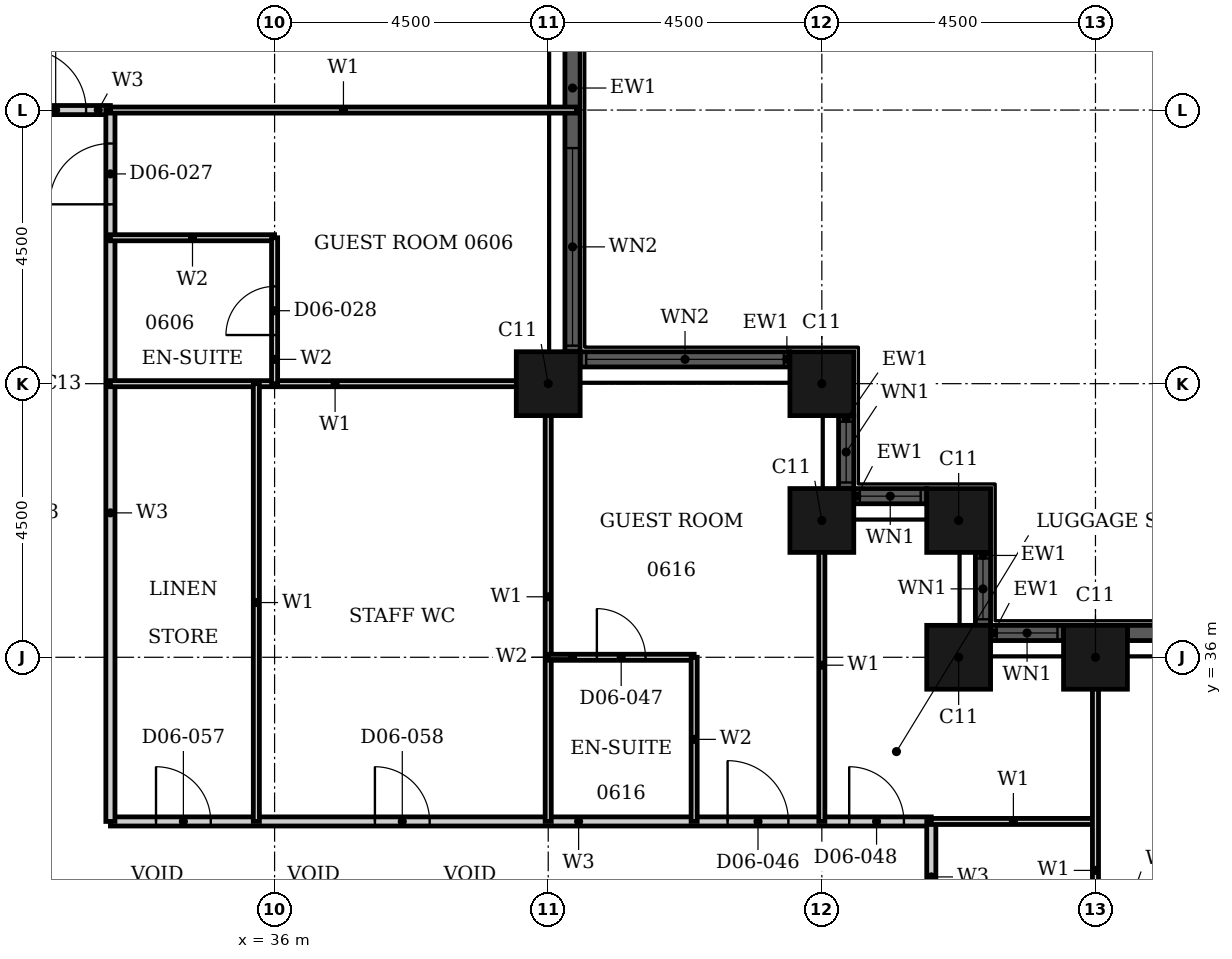
"""IFC4 building model, lengths in metres.
Left out: names, types, materials, properties, quantities, classifications, styles, units other than length and angle.
Written with IfcOpenShell. Run it as: python <this file> out.ifc"""

import sys

from ifc_helpers import new_model, si_unit, direction, frame, frame_2d, origin, origin_2d, place, context, subcontext, project, spatial, rectangle, hollow_rectangle, extrude, element, fill, save


model = new_model("IFC4")
c1 = context("Model", 3, precision=1e-05, world=origin(), true_north=direction((0.0, 1.0)))
c2 = subcontext(c1, "Body", "Model", "MODEL_VIEW")
j1 = project(units=[si_unit("LENGTHUNIT", "METRE"), si_unit("PLANEANGLEUNIT", "RADIAN")], contexts=[c1])
p1 = place(None, origin())
s1 = spatial("IfcSite", under=j1, at=p1, CompositionType="ELEMENT")
p2 = place(p1, origin())
s2 = spatial("IfcBuilding", under=s1, at=p2, CompositionType="ELEMENT")
p3 = place(p2, frame((0.0, 0.0, 33.6)))
s3 = spatial("IfcBuildingStorey", under=s2, at=p3, CompositionType="ELEMENT", Elevation=33.6)
for number, where, z_axis, x_axis in (
    (1, (49.5, 36.0, 0.0), (0.0, 0.0, 1.0), (1.0, 0.0, 0.0)),
    (2, (47.25, 36.0, 0.0), (0.0, 0.0, 1.0), (1.0, 0.0, 0.0)),
    (3, (47.25, 38.25, 0.0), (0.0, 0.0, 1.0), (1.0, 0.0, 0.0)),
    (4, (45.0, 38.25, 0.0), (0.0, 0.0, 1.0), (1.0, 0.0, 0.0)),
    (5, (45.0, 40.5, 0.0), (0.0, 0.0, 1.0), (1.0, 0.0, 0.0)),
    (6, (40.5, 40.5, 0.0), (0.0, 0.0, 1.0), (1.0, 0.0, 0.0)),
):
    element("IfcColumn", number, at=place(p3, frame(where, z_axis=z_axis, x_axis=x_axis)), inside=s3, PredefinedType="COLUMN", context=c2, shape_type="SweptSolid", body=[
        extrude(hollow_rectangle(XDim=1.05, YDim=1.05, WallThickness=0.034, at=origin_2d()), origin(), (0.0, 0.0, 1.0), 3.6),
    ])
p4 = place(p3, frame((57.975, 36.4, 0.0), z_axis=(0.0, 0.0, 1.0), x_axis=(-1.0, 0.0, 0.0)))
e7 = element("IfcWall", 7, at=p4, inside=s3, PredefinedType="SOLIDWALL", context=c2, shape_type="SweptSolid", body=[
    extrude(rectangle(XDim=7.95, YDim=0.25, at=frame_2d((3.975, 0.0))), origin(), (0.0, 0.0, 1.0), 3.6),
])
p5 = place(p4, frame((0.1, 0.0, 0.9)))
e8 = element("IfcOpeningElement", 8, at=p5, cuts=e7, PredefinedType="OPENING", context=c2, shape_type="SweptSolid", body=[
    extrude(rectangle(XDim=3.25, YDim=2.08, at=frame_2d((1.625, 1.04))), frame((0.0, 0.135, 0.0), z_axis=(0.0, -1.0, 0.0), x_axis=(1.0, 0.0, 0.0)), (0.0, 0.0, 1.0), 0.27),
])
p6 = place(p4, frame((5.325, 0.0, 0.0)))
e9 = element("IfcOpeningElement", 9, at=p6, cuts=e7, PredefinedType="OPENING", context=c2, shape_type="SweptSolid", body=[
    extrude(rectangle(XDim=1.8, YDim=2.4, at=frame_2d((0.9, 1.2))), frame((0.0, 0.135, 0.0), z_axis=(0.0, -1.0, 0.0), x_axis=(1.0, 0.0, 0.0)), (0.0, 0.0, 1.0), 0.27),
])
p7 = place(p3, frame((48.975, 36.4, 0.0), z_axis=(0.0, 0.0, 1.0), x_axis=(-1.0, 0.0, 0.0)))
e10 = element("IfcWall", 10, at=p7, inside=s3, PredefinedType="SOLIDWALL", context=c2, shape_type="SweptSolid", body=[
    extrude(rectangle(XDim=1.2, YDim=0.25, at=frame_2d((0.6, 0.0))), origin(), (0.0, 0.0, 1.0), 3.6),
])
p8 = place(p7, frame((0.1, 0.0, 0.9)))
e11 = element("IfcOpeningElement", 11, at=p8, cuts=e10, PredefinedType="OPENING", context=c2, shape_type="SweptSolid", body=[
    extrude(rectangle(XDim=1.0, YDim=2.08, at=frame_2d((0.5, 1.04))), frame((0.0, 0.135, 0.0), z_axis=(0.0, -1.0, 0.0), x_axis=(1.0, 0.0, 0.0)), (0.0, 0.0, 1.0), 0.27),
])
p9 = place(p3, frame((47.65, 36.525, 0.0), z_axis=(0.0, 0.0, 1.0), x_axis=(0.0, 1.0, 0.0)))
e12 = element("IfcWall", 12, at=p9, inside=s3, PredefinedType="SOLIDWALL", context=c2, shape_type="SweptSolid", body=[
    extrude(rectangle(XDim=1.2, YDim=0.25, at=frame_2d((0.6, 0.0))), origin(), (0.0, 0.0, 1.0), 3.6),
])
p10 = place(p9, frame((0.1, 0.0, 0.9)))
e13 = element("IfcOpeningElement", 13, at=p10, cuts=e12, PredefinedType="OPENING", context=c2, shape_type="SweptSolid", body=[
    extrude(rectangle(XDim=1.0, YDim=2.08, at=frame_2d((0.5, 1.04))), frame((0.0, 0.135, 0.0), z_axis=(0.0, -1.0, 0.0), x_axis=(1.0, 0.0, 0.0)), (0.0, 0.0, 1.0), 0.27),
])
p11 = place(p3, frame((46.725, 38.65, 0.0), z_axis=(0.0, 0.0, 1.0), x_axis=(-1.0, 0.0, 0.0)))
e14 = element("IfcWall", 14, at=p11, inside=s3, PredefinedType="SOLIDWALL", context=c2, shape_type="SweptSolid", body=[
    extrude(rectangle(XDim=1.2, YDim=0.25, at=frame_2d((0.6, 0.0))), origin(), (0.0, 0.0, 1.0), 3.6),
])
p12 = place(p11, frame((0.1, 0.0, 0.9)))
e15 = element("IfcOpeningElement", 15, at=p12, cuts=e14, PredefinedType="OPENING", context=c2, shape_type="SweptSolid", body=[
    extrude(rectangle(XDim=1.0, YDim=2.08, at=frame_2d((0.5, 1.04))), frame((0.0, 0.135, 0.0), z_axis=(0.0, -1.0, 0.0), x_axis=(1.0, 0.0, 0.0)), (0.0, 0.0, 1.0), 0.27),
])
p13 = place(p3, frame((45.4, 38.775, 0.0), z_axis=(0.0, 0.0, 1.0), x_axis=(0.0, 1.0, 0.0)))
e16 = element("IfcWall", 16, at=p13, inside=s3, PredefinedType="SOLIDWALL", context=c2, shape_type="SweptSolid", body=[
    extrude(rectangle(XDim=1.2, YDim=0.25, at=frame_2d((0.6, 0.0))), origin(), (0.0, 0.0, 1.0), 3.6),
])
p14 = place(p13, frame((0.1, 0.0, 0.9)))
e17 = element("IfcOpeningElement", 17, at=p14, cuts=e16, PredefinedType="OPENING", context=c2, shape_type="SweptSolid", body=[
    extrude(rectangle(XDim=1.0, YDim=2.08, at=frame_2d((0.5, 1.04))), frame((0.0, 0.135, 0.0), z_axis=(0.0, -1.0, 0.0), x_axis=(1.0, 0.0, 0.0)), (0.0, 0.0, 1.0), 0.27),
])
p15 = place(p3, frame((44.475, 40.9, 0.0), z_axis=(0.0, 0.0, 1.0), x_axis=(-1.0, 0.0, 0.0)))
e18 = element("IfcWall", 18, at=p15, inside=s3, PredefinedType="SOLIDWALL", context=c2, shape_type="SweptSolid", body=[
    extrude(rectangle(XDim=3.45, YDim=0.25, at=frame_2d((1.725, 0.0))), origin(), (0.0, 0.0, 1.0), 3.6),
])
p16 = place(p15, frame((0.1, 0.0, 0.9)))
e19 = element("IfcOpeningElement", 19, at=p16, cuts=e18, PredefinedType="OPENING", context=c2, shape_type="SweptSolid", body=[
    extrude(rectangle(XDim=3.25, YDim=2.08, at=frame_2d((1.625, 1.04))), frame((0.0, 0.135, 0.0), z_axis=(0.0, -1.0, 0.0), x_axis=(1.0, 0.0, 0.0)), (0.0, 0.0, 1.0), 0.27),
])
p17 = place(p3, frame((40.9, 41.025, 0.0), z_axis=(0.0, 0.0, 1.0), x_axis=(0.0, 1.0, 0.0)))
e20 = element("IfcWall", 20, at=p17, inside=s3, PredefinedType="SOLIDWALL", context=c2, shape_type="SweptSolid", body=[
    extrude(rectangle(XDim=7.95, YDim=0.25, at=frame_2d((3.975, 0.0))), origin(), (0.0, 0.0, 1.0), 3.6),
])
p18 = place(p17, frame((0.1, 0.0, 0.9)))
e21 = element("IfcOpeningElement", 21, at=p18, cuts=e20, PredefinedType="OPENING", context=c2, shape_type="SweptSolid", body=[
    extrude(rectangle(XDim=3.25, YDim=2.08, at=frame_2d((1.625, 1.04))), frame((0.0, 0.135, 0.0), z_axis=(0.0, -1.0, 0.0), x_axis=(1.0, 0.0, 0.0)), (0.0, 0.0, 1.0), 0.27),
])
p19 = place(p17, frame((5.325, 0.0, 0.0)))
e22 = element("IfcOpeningElement", 22, at=p19, cuts=e20, PredefinedType="OPENING", context=c2, shape_type="SweptSolid", body=[
    extrude(rectangle(XDim=1.8, YDim=2.4, at=frame_2d((0.9, 1.2))), frame((0.0, 0.135, 0.0), z_axis=(0.0, -1.0, 0.0), x_axis=(1.0, 0.0, 0.0)), (0.0, 0.0, 1.0), 0.27),
])
p20 = place(p3, frame((33.3, 33.3, 0.0), z_axis=(0.0, 0.0, 1.0), x_axis=(1.0, 0.0, 0.0)))
e23 = element("IfcWall", 23, at=p20, inside=s3, PredefinedType="PARTITIONING", context=c2, shape_type="SweptSolid", body=[
    extrude(rectangle(XDim=13.5, YDim=0.15, at=frame_2d((6.75, 0.0))), origin(), (0.0, 0.0, 1.0), 3.3),
])
p21 = place(p20, frame((10.15, 0.0, 0.0)))
e24 = element("IfcOpeningElement", 24, at=p21, cuts=e23, PredefinedType="OPENING", context=c2, shape_type="SweptSolid", body=[
    extrude(rectangle(XDim=1.0, YDim=2.1, at=frame_2d((0.5, 1.05))), frame((0.0, 0.085, 0.0), z_axis=(0.0, -1.0, 0.0), x_axis=(1.0, 0.0, 0.0)), (0.0, 0.0, 1.0), 0.17),
])
p22 = place(p20, frame((12.15, 0.0, 0.0)))
e25 = element("IfcOpeningElement", 25, at=p22, cuts=e23, PredefinedType="OPENING", context=c2, shape_type="SweptSolid", body=[
    extrude(rectangle(XDim=0.9, YDim=2.1, at=frame_2d((0.45, 1.05))), frame((0.0, 0.085, 0.0), z_axis=(0.0, -1.0, 0.0), x_axis=(1.0, 0.0, 0.0)), (0.0, 0.0, 1.0), 0.17),
])
p23 = place(p20, frame((0.75, 0.0, 0.0)))
e26 = element("IfcOpeningElement", 26, at=p23, cuts=e23, PredefinedType="OPENING", context=c2, shape_type="SweptSolid", body=[
    extrude(rectangle(XDim=0.9, YDim=2.1, at=frame_2d((0.45, 1.05))), frame((0.0, 0.085, 0.0), z_axis=(0.0, -1.0, 0.0), x_axis=(1.0, 0.0, 0.0)), (0.0, 0.0, 1.0), 0.17),
])
p24 = place(p20, frame((4.35, 0.0, 0.0)))
e27 = element("IfcOpeningElement", 27, at=p24, cuts=e23, PredefinedType="OPENING", context=c2, shape_type="SweptSolid", body=[
    extrude(rectangle(XDim=0.9, YDim=2.1, at=frame_2d((0.45, 1.05))), frame((0.0, 0.085, 0.0), z_axis=(0.0, -1.0, 0.0), x_axis=(1.0, 0.0, 0.0)), (0.0, 0.0, 1.0), 0.17),
])
p25 = place(p3, frame((31.5, 45.0, 0.0), z_axis=(0.0, 0.0, 1.0), x_axis=(1.0, 0.0, 0.0)))
e28 = element("IfcWall", 28, at=p25, inside=s3, PredefinedType="PARTITIONING", context=c2, shape_type="SweptSolid", body=[
    extrude(rectangle(XDim=1.8, YDim=0.15, at=frame_2d((0.9, 0.0))), origin(), (0.0, 0.0, 1.0), 3.3),
])
p26 = place(p25, frame((0.4, 0.0, 0.0)))
e29 = element("IfcOpeningElement", 29, at=p26, cuts=e28, PredefinedType="OPENING", context=c2, shape_type="SweptSolid", body=[
    extrude(rectangle(XDim=1.0, YDim=2.1, at=frame_2d((0.5, 1.05))), frame((0.0, 0.085, 0.0), z_axis=(0.0, -1.0, 0.0), x_axis=(1.0, 0.0, 0.0)), (0.0, 0.0, 1.0), 0.17),
])
p27 = place(p3, frame((33.3, 33.3, 0.0), z_axis=(0.0, 0.0, 1.0), x_axis=(0.0, 1.0, 0.0)))
e30 = element("IfcWall", 30, at=p27, inside=s3, PredefinedType="PARTITIONING", context=c2, shape_type="SweptSolid", body=[
    extrude(rectangle(XDim=11.7, YDim=0.15, at=frame_2d((5.85, 0.0))), origin(), (0.0, 0.0, 1.0), 3.3),
])
p28 = place(p27, frame((10.15, 0.0, 0.0)))
e31 = element("IfcOpeningElement", 31, at=p28, cuts=e30, PredefinedType="OPENING", context=c2, shape_type="SweptSolid", body=[
    extrude(rectangle(XDim=1.0, YDim=2.1, at=frame_2d((0.5, 1.05))), frame((0.0, 0.085, 0.0), z_axis=(0.0, -1.0, 0.0), x_axis=(1.0, 0.0, 0.0)), (0.0, 0.0, 1.0), 0.17),
])
p29 = place(p3, frame((46.8, 28.8, 0.0), z_axis=(0.0, 0.0, 1.0), x_axis=(0.0, 1.0, 0.0)))
e32 = element("IfcWall", 32, at=p29, inside=s3, PredefinedType="PARTITIONING", context=c2, shape_type="SweptSolid", body=[
    extrude(rectangle(XDim=4.5, YDim=0.15, at=frame_2d((2.25, 0.0))), origin(), (0.0, 0.0, 1.0), 3.3),
])
p30 = place(p29, frame((1.725, 0.0, 0.0)))
e33 = element("IfcOpeningElement", 33, at=p30, cuts=e32, PredefinedType="OPENING", context=c2, shape_type="SweptSolid", body=[
    extrude(rectangle(XDim=0.95, YDim=2.1, at=frame_2d((0.475, 1.05))), frame((0.0, 0.085, 0.0), z_axis=(0.0, -1.0, 0.0), x_axis=(1.0, 0.0, 0.0)), (0.0, 0.0, 1.0), 0.17),
])
p31 = place(p3, frame((46.8, 33.3, 0.0), z_axis=(0.0, 0.0, 1.0), x_axis=(1.0, 0.0, 0.0)))
e34 = element("IfcWall", 34, at=p31, inside=s3, PredefinedType="PARTITIONING", context=c2, shape_type="SweptSolid", body=[
    extrude(rectangle(XDim=2.7, YDim=0.1, at=frame_2d((1.35, 0.0))), origin(), (0.0, 0.0, 1.0), 3.3),
])
p32 = place(p3, frame((33.3, 40.5, 0.0), z_axis=(0.0, 0.0, 1.0), x_axis=(1.0, 0.0, 0.0)))
e35 = element("IfcWall", 35, at=p32, inside=s3, PredefinedType="PARTITIONING", context=c2, shape_type="SweptSolid", body=[
    extrude(rectangle(XDim=7.39, YDim=0.1, at=frame_2d((3.695, 0.0))), origin(), (0.0, 0.0, 1.0), 2.38),
])
p33 = place(p3, frame((33.3, 45.0, 0.0), z_axis=(0.0, 0.0, 1.0), x_axis=(1.0, 0.0, 0.0)))
e36 = element("IfcWall", 36, at=p33, inside=s3, PredefinedType="PARTITIONING", context=c2, shape_type="SweptSolid", body=[
    extrude(rectangle(XDim=7.665, YDim=0.1, at=frame_2d((3.833, 0.0))), origin(), (0.0, 0.0, 1.0), 3.3),
])
p34 = place(p3, frame((35.7, 33.3, 0.0), z_axis=(0.0, 0.0, 1.0), x_axis=(0.0, 1.0, 0.0)))
e37 = element("IfcWall", 37, at=p34, inside=s3, PredefinedType="PARTITIONING", context=c2, shape_type="SweptSolid", body=[
    extrude(rectangle(XDim=7.2, YDim=0.1, at=frame_2d((3.6, 0.0))), origin(), (0.0, 0.0, 1.0), 3.3),
])
p35 = place(p3, frame((40.5, 33.3, 0.0), z_axis=(0.0, 0.0, 1.0), x_axis=(0.0, 1.0, 0.0)))
e38 = element("IfcWall", 38, at=p35, inside=s3, PredefinedType="PARTITIONING", context=c2, shape_type="SweptSolid", body=[
    extrude(rectangle(XDim=7.39, YDim=0.1, at=frame_2d((3.695, 0.0))), origin(), (0.0, 0.0, 1.0), 3.3),
])
p36 = place(p3, frame((45.0, 33.3, 0.0), z_axis=(0.0, 0.0, 1.0), x_axis=(0.0, 1.0, 0.0)))
e39 = element("IfcWall", 39, at=p36, inside=s3, PredefinedType="PARTITIONING", context=c2, shape_type="SweptSolid", body=[
    extrude(rectangle(XDim=5.14, YDim=0.1, at=frame_2d((2.57, 0.0))), origin(), (0.0, 0.0, 1.0), 3.3),
])
p37 = place(p3, frame((49.5, 28.8, 0.0), z_axis=(0.0, 0.0, 1.0), x_axis=(0.0, 1.0, 0.0)))
e40 = element("IfcWall", 40, at=p37, inside=s3, PredefinedType="PARTITIONING", context=c2, shape_type="SweptSolid", body=[
    extrude(rectangle(XDim=7.39, YDim=0.1, at=frame_2d((3.695, 0.0))), origin(), (0.0, 0.0, 1.0), 2.38),
])
p38 = place(p3, frame((40.5, 36.0, 0.0), z_axis=(0.0, 0.0, 1.0), x_axis=(1.0, 0.0, 0.0)))
e41 = element("IfcWall", 41, at=p38, inside=s3, PredefinedType="PARTITIONING", context=c2, shape_type="SweptSolid", body=[
    extrude(rectangle(XDim=2.4, YDim=0.1, at=frame_2d((1.2, 0.0))), origin(), (0.0, 0.0, 1.0), 3.3),
])
p39 = place(p38, frame((0.8, 0.0, 0.0)))
e42 = element("IfcOpeningElement", 42, at=p39, cuts=e41, PredefinedType="OPENING", context=c2, shape_type="SweptSolid", body=[
    extrude(rectangle(XDim=0.8, YDim=2.1, at=frame_2d((0.4, 1.05))), frame((0.0, 0.06, 0.0), z_axis=(0.0, -1.0, 0.0), x_axis=(1.0, 0.0, 0.0)), (0.0, 0.0, 1.0), 0.12),
])
p40 = place(p3, frame((33.3, 42.9, 0.0), z_axis=(0.0, 0.0, 1.0), x_axis=(1.0, 0.0, 0.0)))
e43 = element("IfcWall", 43, at=p40, inside=s3, PredefinedType="PARTITIONING", context=c2, shape_type="SweptSolid", body=[
    extrude(rectangle(XDim=2.7, YDim=0.1, at=frame_2d((1.35, 0.0))), origin(), (0.0, 0.0, 1.0), 3.3),
])
p41 = place(p3, frame((36.0, 40.5, 0.0), z_axis=(0.0, 0.0, 1.0), x_axis=(0.0, 1.0, 0.0)))
e44 = element("IfcWall", 44, at=p41, inside=s3, PredefinedType="PARTITIONING", context=c2, shape_type="SweptSolid", body=[
    extrude(rectangle(XDim=2.4, YDim=0.1, at=frame_2d((1.2, 0.0))), origin(), (0.0, 0.0, 1.0), 2.58),
])
p42 = place(p41, frame((0.8, 0.0, 0.0)))
e45 = element("IfcOpeningElement", 45, at=p42, cuts=e44, PredefinedType="OPENING", context=c2, shape_type="SweptSolid", body=[
    extrude(rectangle(XDim=0.8, YDim=2.1, at=frame_2d((0.4, 1.05))), frame((0.0, 0.06, 0.0), z_axis=(0.0, -1.0, 0.0), x_axis=(1.0, 0.0, 0.0)), (0.0, 0.0, 1.0), 0.12),
])
p43 = place(p3, frame((42.9, 33.3, 0.0), z_axis=(0.0, 0.0, 1.0), x_axis=(0.0, 1.0, 0.0)))
e46 = element("IfcWall", 46, at=p43, inside=s3, PredefinedType="PARTITIONING", context=c2, shape_type="SweptSolid", body=[
    extrude(rectangle(XDim=2.7, YDim=0.1, at=frame_2d((1.35, 0.0))), origin(), (0.0, 0.0, 1.0), 3.3),
])
p44 = place(p8, origin())
e47 = element("IfcWindow", 47, at=p44, inside=s3, PartitioningType="SINGLE_PANEL", PredefinedType="WINDOW", context=c2, shape_type="SweptSolid", body=[
    extrude(rectangle(XDim=1.0, YDim=2.08, at=frame_2d((0.5, 1.04))), frame((0.0, 0.03, 0.0), z_axis=(0.0, -1.0, 0.0), x_axis=(1.0, 0.0, 0.0)), (0.0, 0.0, 1.0), 0.06),
])
fill(e11, e47)
p45 = place(p10, origin())
e48 = element("IfcWindow", 48, at=p45, inside=s3, PartitioningType="SINGLE_PANEL", PredefinedType="WINDOW", context=c2, shape_type="SweptSolid", body=[
    extrude(rectangle(XDim=1.0, YDim=2.08, at=frame_2d((0.5, 1.04))), frame((0.0, 0.03, 0.0), z_axis=(0.0, -1.0, 0.0), x_axis=(1.0, 0.0, 0.0)), (0.0, 0.0, 1.0), 0.06),
])
fill(e13, e48)
p46 = place(p12, origin())
e49 = element("IfcWindow", 49, at=p46, inside=s3, PartitioningType="SINGLE_PANEL", PredefinedType="WINDOW", context=c2, shape_type="SweptSolid", body=[
    extrude(rectangle(XDim=1.0, YDim=2.08, at=frame_2d((0.5, 1.04))), frame((0.0, 0.03, 0.0), z_axis=(0.0, -1.0, 0.0), x_axis=(1.0, 0.0, 0.0)), (0.0, 0.0, 1.0), 0.06),
])
fill(e15, e49)
p47 = place(p14, origin())
e50 = element("IfcWindow", 50, at=p47, inside=s3, PartitioningType="SINGLE_PANEL", PredefinedType="WINDOW", context=c2, shape_type="SweptSolid", body=[
    extrude(rectangle(XDim=1.0, YDim=2.08, at=frame_2d((0.5, 1.04))), frame((0.0, 0.03, 0.0), z_axis=(0.0, -1.0, 0.0), x_axis=(1.0, 0.0, 0.0)), (0.0, 0.0, 1.0), 0.06),
])
fill(e17, e50)
p48 = place(p16, origin())
e51 = element("IfcWindow", 51, at=p48, inside=s3, PartitioningType="SINGLE_PANEL", PredefinedType="WINDOW", context=c2, shape_type="SweptSolid", body=[
    extrude(rectangle(XDim=3.25, YDim=2.08, at=frame_2d((1.625, 1.04))), frame((0.0, 0.03, 0.0), z_axis=(0.0, -1.0, 0.0), x_axis=(1.0, 0.0, 0.0)), (0.0, 0.0, 1.0), 0.06),
])
fill(e19, e51)
p49 = place(p18, origin())
e52 = element("IfcWindow", 52, at=p49, inside=s3, PartitioningType="SINGLE_PANEL", PredefinedType="WINDOW", context=c2, shape_type="SweptSolid", body=[
    extrude(rectangle(XDim=3.25, YDim=2.08, at=frame_2d((1.625, 1.04))), frame((0.0, 0.03, 0.0), z_axis=(0.0, -1.0, 0.0), x_axis=(1.0, 0.0, 0.0)), (0.0, 0.0, 1.0), 0.06),
])
fill(e21, e52)
p50 = place(p28, origin())
e53 = element("IfcDoor", 53, at=p50, inside=s3, OperationType="SINGLE_SWING_RIGHT", PredefinedType="DOOR", context=c2, shape_type="SweptSolid", body=[
    extrude(rectangle(XDim=1.0, YDim=2.1, at=frame_2d((0.5, 1.05))), frame((0.0, 0.025, 0.0), z_axis=(0.0, -1.0, 0.0), x_axis=(1.0, 0.0, 0.0)), (0.0, 0.0, 1.0), 0.05),
])
fill(e31, e53)
p51 = place(p42, origin())
e54 = element("IfcDoor", 54, at=p51, inside=s3, OperationType="SINGLE_SWING_RIGHT", PredefinedType="DOOR", context=c2, shape_type="SweptSolid", body=[
    extrude(rectangle(XDim=0.8, YDim=2.1, at=frame_2d((0.4, 1.05))), frame((0.0, 0.025, 0.0), z_axis=(0.0, -1.0, 0.0), x_axis=(1.0, 0.0, 0.0)), (0.0, 0.0, 1.0), 0.05),
])
fill(e45, e54)
p52 = place(p26, origin())
e55 = element("IfcDoor", 55, at=p52, inside=s3, OperationType="SINGLE_SWING_LEFT", PredefinedType="DOOR", context=c2, shape_type="SweptSolid", body=[
    extrude(rectangle(XDim=1.0, YDim=2.1, at=frame_2d((0.5, 1.05))), frame((0.0, 0.025, 0.0), z_axis=(0.0, -1.0, 0.0), x_axis=(1.0, 0.0, 0.0)), (0.0, 0.0, 1.0), 0.05),
])
fill(e29, e55)
p53 = place(p21, origin())
e56 = element("IfcDoor", 56, at=p53, inside=s3, OperationType="SINGLE_SWING_RIGHT", PredefinedType="DOOR", context=c2, shape_type="SweptSolid", body=[
    extrude(rectangle(XDim=1.0, YDim=2.1, at=frame_2d((0.5, 1.05))), frame((0.0, 0.025, 0.0), z_axis=(0.0, -1.0, 0.0), x_axis=(1.0, 0.0, 0.0)), (0.0, 0.0, 1.0), 0.05),
])
fill(e24, e56)
p54 = place(p39, origin())
e57 = element("IfcDoor", 57, at=p54, inside=s3, OperationType="SINGLE_SWING_LEFT", PredefinedType="DOOR", context=c2, shape_type="SweptSolid", body=[
    extrude(rectangle(XDim=0.8, YDim=2.1, at=frame_2d((0.4, 1.05))), frame((0.0, 0.025, 0.0), z_axis=(0.0, -1.0, 0.0), x_axis=(1.0, 0.0, 0.0)), (0.0, 0.0, 1.0), 0.05),
])
fill(e42, e57)
p55 = place(p22, origin())
e58 = element("IfcDoor", 58, at=p55, inside=s3, OperationType="SINGLE_SWING_LEFT", PredefinedType="DOOR", context=c2, shape_type="SweptSolid", body=[
    extrude(rectangle(XDim=0.9, YDim=2.1, at=frame_2d((0.45, 1.05))), frame((0.0, 0.025, 0.0), z_axis=(0.0, -1.0, 0.0), x_axis=(1.0, 0.0, 0.0)), (0.0, 0.0, 1.0), 0.05),
])
fill(e25, e58)
p56 = place(p23, origin())
e59 = element("IfcDoor", 59, at=p56, inside=s3, OperationType="SINGLE_SWING_RIGHT", PredefinedType="DOOR", context=c2, shape_type="SweptSolid", body=[
    extrude(rectangle(XDim=0.9, YDim=2.1, at=frame_2d((0.45, 1.05))), frame((0.0, 0.025, 0.0), z_axis=(0.0, -1.0, 0.0), x_axis=(1.0, 0.0, 0.0)), (0.0, 0.0, 1.0), 0.05),
])
fill(e26, e59)
p57 = place(p24, origin())
e60 = element("IfcDoor", 60, at=p57, inside=s3, OperationType="SINGLE_SWING_LEFT", PredefinedType="DOOR", context=c2, shape_type="SweptSolid", body=[
    extrude(rectangle(XDim=0.9, YDim=2.1, at=frame_2d((0.45, 1.05))), frame((0.0, 0.025, 0.0), z_axis=(0.0, -1.0, 0.0), x_axis=(1.0, 0.0, 0.0)), (0.0, 0.0, 1.0), 0.05),
])
fill(e27, e60)
save(model, sys.argv[1])
